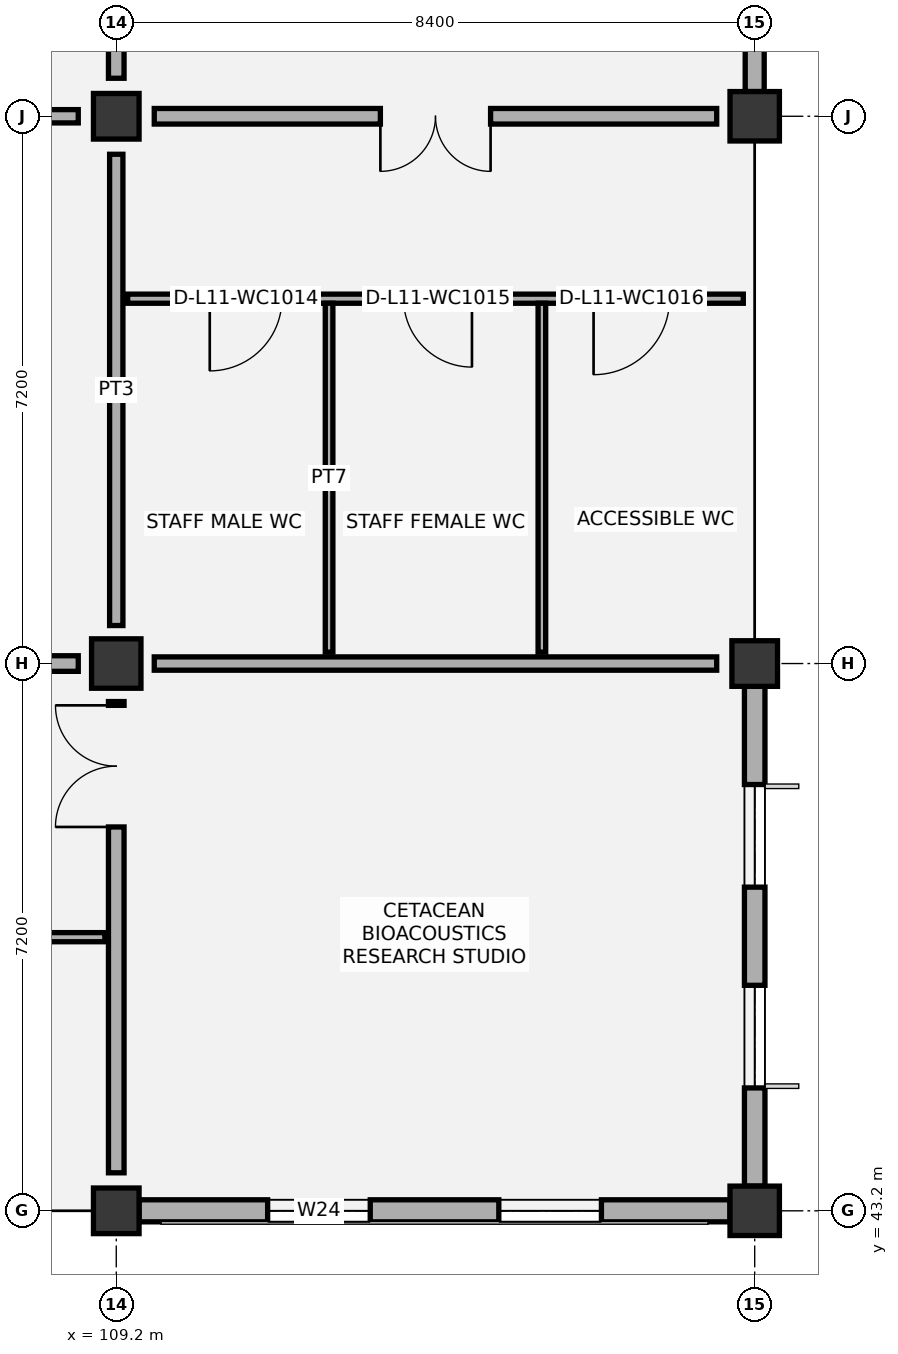
"""IFC4 building model, lengths in metres.
Left out: names, types, materials, properties, quantities, classifications, styles, units other than length and angle.
Written with IfcOpenShell. Run it as: python <this file> out.ifc"""

import sys

from ifc_helpers import new_model, si_unit, direction, frame, frame_2d, origin, origin_2d, place, context, subcontext, project, spatial, rectangle, extrude, element, fill, save


model = new_model("IFC4")
c1 = context("Model", 3, precision=1e-05, world=origin(), true_north=direction((0.0, 1.0)))
c2 = subcontext(c1, "Body", "Model", "MODEL_VIEW")
j1 = project(units=[si_unit("LENGTHUNIT", "METRE"), si_unit("PLANEANGLEUNIT", "RADIAN")], contexts=[c1])
p1 = place(None, origin())
s1 = spatial("IfcSite", under=j1, at=p1, CompositionType="ELEMENT")
p2 = place(p1, origin())
s2 = spatial("IfcBuilding", under=s1, at=p2, CompositionType="ELEMENT")
p3 = place(p2, frame((0.0, 0.0, 52.2)))
s3 = spatial("IfcBuildingStorey", under=s2, at=p3, CompositionType="ELEMENT", Elevation=52.2)
p4 = place(p3, frame((109.2, 43.2, 0.0), z_axis=(0.0, 0.0, 1.0), x_axis=(1.0, 0.0, 0.0)))
e1 = element("IfcColumn", 1, at=p4, inside=s3, PredefinedType="COLUMN", context=c2, shape_type="SweptSolid", body=[
    extrude(rectangle(XDim=0.6, YDim=0.6, at=origin_2d()), origin(), (0.0, 0.0, 1.0), 4.2),
])
p5 = place(p3, frame((109.2, 50.4, 0.0), z_axis=(0.0, 0.0, 1.0), x_axis=(1.0, 0.0, 0.0)))
e2 = element("IfcColumn", 2, at=p5, inside=s3, PredefinedType="COLUMN", context=c2, shape_type="SweptSolid", body=[
    extrude(rectangle(XDim=0.65, YDim=0.65, at=origin_2d()), origin(), (0.0, 0.0, 1.0), 4.2),
])
p6 = place(p3, frame((109.2, 57.6, 0.0), z_axis=(0.0, 0.0, 1.0), x_axis=(1.0, 0.0, 0.0)))
e3 = element("IfcColumn", 3, at=p6, inside=s3, PredefinedType="COLUMN", context=c2, shape_type="SweptSolid", body=[
    extrude(rectangle(XDim=0.6, YDim=0.6, at=origin_2d()), origin(), (0.0, 0.0, 1.0), 4.2),
])
p7 = place(p3, frame((117.6, 43.2, 0.0), z_axis=(0.0, 0.0, 1.0), x_axis=(1.0, 0.0, 0.0)))
e4 = element("IfcColumn", 4, at=p7, inside=s3, PredefinedType="COLUMN", context=c2, shape_type="SweptSolid", body=[
    extrude(rectangle(XDim=0.65, YDim=0.65, at=origin_2d()), origin(), (0.0, 0.0, 1.0), 4.2),
])
p8 = place(p3, frame((117.6, 50.4, 0.0), z_axis=(0.0, 0.0, 1.0), x_axis=(1.0, 0.0, 0.0)))
e5 = element("IfcColumn", 5, at=p8, inside=s3, PredefinedType="COLUMN", context=c2, shape_type="SweptSolid", body=[
    extrude(rectangle(XDim=0.6, YDim=0.6, at=origin_2d()), origin(), (0.0, 0.0, 1.0), 4.2),
])
p9 = place(p3, frame((117.6, 57.6, 0.0), z_axis=(0.0, 0.0, 1.0), x_axis=(1.0, 0.0, 0.0)))
e6 = element("IfcColumn", 6, at=p9, inside=s3, PredefinedType="COLUMN", context=c2, shape_type="SweptSolid", body=[
    extrude(rectangle(XDim=0.65, YDim=0.65, at=origin_2d()), origin(), (0.0, 0.0, 1.0), 4.2),
])
p10 = place(p3, frame((109.5, 43.2, 0.0), z_axis=(0.0, 0.0, 1.0), x_axis=(1.0, 0.0, 0.0)))
e7 = element("IfcWall", 7, at=p10, inside=s3, PredefinedType="SOLIDWALL", context=c2, shape_type="SweptSolid", body=[
    extrude(rectangle(XDim=7.775, YDim=0.29, at=frame_2d((3.887, 0.0))), origin(), (0.0, 0.0, 1.0), 3.365),
])
p11 = place(p10, frame((1.692, 0.0, 0.95)))
e8 = element("IfcOpeningElement", 8, at=p11, cuts=e7, PredefinedType="OPENING", context=c2, shape_type="SweptSolid", body=[
    extrude(rectangle(XDim=1.35, YDim=1.65, at=frame_2d((0.675, 0.825))), frame((0.0, 0.155, 0.0), z_axis=(0.0, -1.0, 0.0), x_axis=(1.0, 0.0, 0.0)), (0.0, 0.0, 1.0), 0.31),
])
p12 = place(p10, frame((4.733, 0.0, 0.95)))
e9 = element("IfcOpeningElement", 9, at=p12, cuts=e7, PredefinedType="OPENING", context=c2, shape_type="SweptSolid", body=[
    extrude(rectangle(XDim=1.35, YDim=1.65, at=frame_2d((0.675, 0.825))), frame((0.0, 0.155, 0.0), z_axis=(0.0, -1.0, 0.0), x_axis=(1.0, 0.0, 0.0)), (0.0, 0.0, 1.0), 0.31),
])
p13 = place(p3, frame((117.6, 43.525, 0.0), z_axis=(0.0, 0.0, 1.0), x_axis=(0.0, 1.0, 0.0)))
e10 = element("IfcWall", 10, at=p13, inside=s3, PredefinedType="SOLIDWALL", context=c2, shape_type="SweptSolid", body=[
    extrude(rectangle(XDim=6.575, YDim=0.27, at=frame_2d((3.288, 0.0))), origin(), (0.0, 0.0, 1.0), 3.365),
])
p14 = place(p13, frame((1.292, 0.0, 0.95)))
e11 = element("IfcOpeningElement", 11, at=p14, cuts=e10, PredefinedType="OPENING", context=c2, shape_type="SweptSolid", body=[
    extrude(rectangle(XDim=1.35, YDim=1.65, at=frame_2d((0.675, 0.825))), frame((0.0, 0.145, 0.0), z_axis=(0.0, -1.0, 0.0), x_axis=(1.0, 0.0, 0.0)), (0.0, 0.0, 1.0), 0.29),
])
p15 = place(p13, frame((3.933, 0.0, 0.95)))
e12 = element("IfcOpeningElement", 12, at=p15, cuts=e10, PredefinedType="OPENING", context=c2, shape_type="SweptSolid", body=[
    extrude(rectangle(XDim=1.35, YDim=1.65, at=frame_2d((0.675, 0.825))), frame((0.0, 0.145, 0.0), z_axis=(0.0, -1.0, 0.0), x_axis=(1.0, 0.0, 0.0)), (0.0, 0.0, 1.0), 0.29),
])
p16 = place(p3, frame((117.6, 57.925, 0.0), z_axis=(0.0, 0.0, 1.0), x_axis=(0.0, 1.0, 0.0)))
e13 = element("IfcWall", 13, at=p16, inside=s3, PredefinedType="SOLIDWALL", context=c2, shape_type="SweptSolid", body=[
    extrude(rectangle(XDim=6.575, YDim=0.25, at=frame_2d((3.288, 0.0))), origin(), (0.0, 0.0, 1.0), 3.365),
])
p17 = place(p16, frame((0.992, 0.0, 0.95)))
e14 = element("IfcOpeningElement", 14, at=p17, cuts=e13, PredefinedType="OPENING", context=c2, shape_type="SweptSolid", body=[
    extrude(rectangle(XDim=1.8, YDim=1.5, at=frame_2d((0.9, 0.75))), frame((0.0, 0.135, 0.0), z_axis=(0.0, -1.0, 0.0), x_axis=(1.0, 0.0, 0.0)), (0.0, 0.0, 1.0), 0.27),
])
p18 = place(p16, frame((3.783, 0.0, 0.95)))
e15 = element("IfcOpeningElement", 15, at=p18, cuts=e13, PredefinedType="OPENING", context=c2, shape_type="SweptSolid", body=[
    extrude(rectangle(XDim=1.8, YDim=1.5, at=frame_2d((0.9, 0.75))), frame((0.0, 0.135, 0.0), z_axis=(0.0, -1.0, 0.0), x_axis=(1.0, 0.0, 0.0)), (0.0, 0.0, 1.0), 0.27),
])
p19 = place(p3, frame((109.35, 55.2, 0.0), z_axis=(0.0, 0.0, 1.0), x_axis=(1.0, 0.0, 0.0)))
e16 = element("IfcWall", 16, at=p19, inside=s3, PredefinedType="PARTITIONING", context=c2, shape_type="SweptSolid", body=[
    extrude(rectangle(XDim=8.1, YDim=0.12, at=frame_2d((4.05, 0.0))), origin(), (0.0, 0.0, 1.0), 3.92),
])
p20 = place(p19, frame((1.08, 0.0, 0.0)))
e17 = element("IfcOpeningElement", 17, at=p20, cuts=e16, PredefinedType="OPENING", context=c2, shape_type="SweptSolid", body=[
    extrude(rectangle(XDim=0.95, YDim=2.1, at=frame_2d((0.475, 1.05))), frame((0.0, 0.07, 0.0), z_axis=(0.0, -1.0, 0.0), x_axis=(1.0, 0.0, 0.0)), (0.0, 0.0, 1.0), 0.14),
])
p21 = place(p19, frame((3.63, 0.0, 0.0)))
e18 = element("IfcOpeningElement", 18, at=p21, cuts=e16, PredefinedType="OPENING", context=c2, shape_type="SweptSolid", body=[
    extrude(rectangle(XDim=0.9, YDim=2.1, at=frame_2d((0.45, 1.05))), frame((0.0, 0.07, 0.0), z_axis=(0.0, -1.0, 0.0), x_axis=(1.0, 0.0, 0.0)), (0.0, 0.0, 1.0), 0.14),
])
p22 = place(p19, frame((6.13, 0.0, 0.0)))
e19 = element("IfcOpeningElement", 19, at=p22, cuts=e16, PredefinedType="OPENING", context=c2, shape_type="SweptSolid", body=[
    extrude(rectangle(XDim=1.0, YDim=2.1, at=frame_2d((0.5, 1.05))), frame((0.0, 0.07, 0.0), z_axis=(0.0, -1.0, 0.0), x_axis=(1.0, 0.0, 0.0)), (0.0, 0.0, 1.0), 0.14),
])
for number, where, z_axis, x_axis in (
    (20, (112.0, 50.55, 0.0), (0.0, 0.0, 1.0), (0.0, 1.0, 0.0)),
    (21, (114.8, 50.55, 0.0), (0.0, 0.0, 1.0), (0.0, 1.0, 0.0)),
):
    element("IfcWall", number, at=place(p3, frame(where, z_axis=z_axis, x_axis=x_axis)), inside=s3, PredefinedType="PARTITIONING", context=c2, shape_type="SweptSolid", body=[
        extrude(rectangle(XDim=4.59, YDim=0.1, at=frame_2d((2.295, 0.0))), origin(), (0.0, 0.0, 1.0), 3.92),
    ])
p23 = place(p3, frame((100.95, 46.8, 0.0), z_axis=(0.0, 0.0, 1.0), x_axis=(1.0, 0.0, 0.0)))
e22 = element("IfcWall", 22, at=p23, inside=s3, PredefinedType="PARTITIONING", context=c2, shape_type="SweptSolid", body=[
    extrude(rectangle(XDim=8.1, YDim=0.12, at=frame_2d((4.05, 0.0))), origin(), (0.0, 0.0, 1.0), 3.92),
])
p24 = place(p23, frame((3.55, 0.0, 0.0)))
e23 = element("IfcOpeningElement", 23, at=p24, cuts=e22, PredefinedType="OPENING", context=c2, shape_type="SweptSolid", body=[
    extrude(rectangle(XDim=1.6, YDim=2.2, at=frame_2d((0.8, 1.1))), frame((0.0, 0.07, 0.0), z_axis=(0.0, -1.0, 0.0), x_axis=(1.0, 0.0, 0.0)), (0.0, 0.0, 1.0), 0.14),
])
p25 = place(p3, frame((109.2, 43.7, 0.0), z_axis=(0.0, 0.0, 1.0), x_axis=(0.0, 1.0, 0.0)))
e24 = element("IfcWall", 24, at=p25, inside=s3, PredefinedType="PARTITIONING", context=c2, shape_type="SweptSolid", body=[
    extrude(rectangle(XDim=6.2, YDim=0.205, at=frame_2d((3.1, 0.0))), origin(), (0.0, 0.0, 1.0), 3.515),
])
p26 = place(p25, frame((4.55, 0.0, 0.0)))
e25 = element("IfcOpeningElement", 25, at=p26, cuts=e24, PredefinedType="OPENING", context=c2, shape_type="SweptSolid", body=[
    extrude(rectangle(XDim=1.6, YDim=2.2, at=frame_2d((0.8, 1.1))), frame((0.0, 0.113, 0.0), z_axis=(0.0, -1.0, 0.0), x_axis=(1.0, 0.0, 0.0)), (0.0, 0.0, 1.0), 0.225),
])
p27 = place(p3, frame((101.3, 50.4, 0.0), z_axis=(0.0, 0.0, 1.0), x_axis=(1.0, 0.0, 0.0)))
e26 = element("IfcWall", 26, at=p27, inside=s3, PredefinedType="PARTITIONING", context=c2, shape_type="SweptSolid", body=[
    extrude(rectangle(XDim=7.4, YDim=0.205, at=frame_2d((3.7, 0.0))), origin(), (0.0, 0.0, 1.0), 3.565),
])
p28 = place(p27, frame((3.025, 0.0, 0.0)))
e27 = element("IfcOpeningElement", 27, at=p28, cuts=e26, PredefinedType="OPENING", context=c2, shape_type="SweptSolid", body=[
    extrude(rectangle(XDim=1.35, YDim=2.15, at=frame_2d((0.675, 1.075))), frame((0.0, 0.113, 0.0), z_axis=(0.0, -1.0, 0.0), x_axis=(1.0, 0.0, 0.0)), (0.0, 0.0, 1.0), 0.225),
])
p29 = place(p3, frame((109.2, 50.9, 0.0), z_axis=(0.0, 0.0, 1.0), x_axis=(0.0, 1.0, 0.0)))
e28 = element("IfcWall", 28, at=p29, inside=s3, PredefinedType="PARTITIONING", context=c2, shape_type="SweptSolid", body=[
    extrude(rectangle(XDim=6.2, YDim=0.175, at=frame_2d((3.1, 0.0))), origin(), (0.0, 0.0, 1.0), 3.415),
])
p30 = place(p3, frame((101.3, 57.6, 0.0), z_axis=(0.0, 0.0, 1.0), x_axis=(1.0, 0.0, 0.0)))
e29 = element("IfcWall", 29, at=p30, inside=s3, PredefinedType="PARTITIONING", context=c2, shape_type="SweptSolid", body=[
    extrude(rectangle(XDim=7.4, YDim=0.175, at=frame_2d((3.7, 0.0))), origin(), (0.0, 0.0, 1.0), 3.565),
])
p31 = place(p30, frame((3.075, 0.0, 0.0)))
e30 = element("IfcOpeningElement", 30, at=p31, cuts=e29, PredefinedType="OPENING", context=c2, shape_type="SweptSolid", body=[
    extrude(rectangle(XDim=1.25, YDim=2.1, at=frame_2d((0.625, 1.05))), frame((0.0, 0.097, 0.0), z_axis=(0.0, -1.0, 0.0), x_axis=(1.0, 0.0, 0.0)), (0.0, 0.0, 1.0), 0.195),
])
p32 = place(p3, frame((109.2, 58.1, 0.0), z_axis=(0.0, 0.0, 1.0), x_axis=(0.0, 1.0, 0.0)))
e31 = element("IfcWall", 31, at=p32, inside=s3, PredefinedType="PARTITIONING", context=c2, shape_type="SweptSolid", body=[
    extrude(rectangle(XDim=6.2, YDim=0.205, at=frame_2d((3.1, 0.0))), origin(), (0.0, 0.0, 1.0), 3.625),
])
p33 = place(p32, frame((2.35, 0.0, 0.0)))
e32 = element("IfcOpeningElement", 32, at=p33, cuts=e31, PredefinedType="OPENING", context=c2, shape_type="SweptSolid", body=[
    extrude(rectangle(XDim=1.5, YDim=2.2, at=frame_2d((0.75, 1.1))), frame((0.0, 0.113, 0.0), z_axis=(0.0, -1.0, 0.0), x_axis=(1.0, 0.0, 0.0)), (0.0, 0.0, 1.0), 0.225),
])
p34 = place(p3, frame((109.7, 50.4, 0.0), z_axis=(0.0, 0.0, 1.0), x_axis=(1.0, 0.0, 0.0)))
e33 = element("IfcWall", 33, at=p34, inside=s3, PredefinedType="PARTITIONING", context=c2, shape_type="SweptSolid", body=[
    extrude(rectangle(XDim=7.4, YDim=0.175, at=frame_2d((3.7, 0.0))), origin(), (0.0, 0.0, 1.0), 3.365),
])
p35 = place(p3, frame((109.7, 57.6, 0.0), z_axis=(0.0, 0.0, 1.0), x_axis=(1.0, 0.0, 0.0)))
e34 = element("IfcWall", 34, at=p35, inside=s3, PredefinedType="PARTITIONING", context=c2, shape_type="SweptSolid", body=[
    extrude(rectangle(XDim=7.4, YDim=0.205, at=frame_2d((3.7, 0.0))), origin(), (0.0, 0.0, 1.0), 3.365),
])
p36 = place(p35, frame((2.975, 0.0, 0.0)))
e35 = element("IfcOpeningElement", 35, at=p36, cuts=e34, PredefinedType="OPENING", context=c2, shape_type="SweptSolid", body=[
    extrude(rectangle(XDim=1.45, YDim=2.2, at=frame_2d((0.725, 1.1))), frame((0.0, 0.113, 0.0), z_axis=(0.0, -1.0, 0.0), x_axis=(1.0, 0.0, 0.0)), (0.0, 0.0, 1.0), 0.225),
])
p37 = place(p11, origin())
e36 = element("IfcWindow", 36, at=p37, inside=s3, PartitioningType="SINGLE_PANEL", PredefinedType="WINDOW", context=c2, shape_type="SweptSolid", body=[
    extrude(rectangle(XDim=1.35, YDim=1.65, at=frame_2d((0.675, 0.825))), frame((0.0, 0.03, 0.0), z_axis=(0.0, -1.0, 0.0), x_axis=(1.0, 0.0, 0.0)), (0.0, 0.0, 1.0), 0.06),
])
fill(e8, e36)
p38 = place(p12, origin())
e37 = element("IfcWindow", 37, at=p38, inside=s3, PartitioningType="SINGLE_PANEL", PredefinedType="WINDOW", context=c2, shape_type="SweptSolid", body=[
    extrude(rectangle(XDim=1.35, YDim=1.65, at=frame_2d((0.675, 0.825))), frame((0.0, 0.03, 0.0), z_axis=(0.0, -1.0, 0.0), x_axis=(1.0, 0.0, 0.0)), (0.0, 0.0, 1.0), 0.06),
])
fill(e9, e37)
p39 = place(p14, origin())
e38 = element("IfcWindow", 38, at=p39, inside=s3, PartitioningType="SINGLE_PANEL", PredefinedType="WINDOW", context=c2, shape_type="SweptSolid", body=[
    extrude(rectangle(XDim=1.35, YDim=1.65, at=frame_2d((0.675, 0.825))), frame((0.0, 0.03, 0.0), z_axis=(0.0, -1.0, 0.0), x_axis=(1.0, 0.0, 0.0)), (0.0, 0.0, 1.0), 0.06),
])
fill(e11, e38)
p40 = place(p15, origin())
e39 = element("IfcWindow", 39, at=p40, inside=s3, PartitioningType="SINGLE_PANEL", PredefinedType="WINDOW", context=c2, shape_type="SweptSolid", body=[
    extrude(rectangle(XDim=1.35, YDim=1.65, at=frame_2d((0.675, 0.825))), frame((0.0, 0.03, 0.0), z_axis=(0.0, -1.0, 0.0), x_axis=(1.0, 0.0, 0.0)), (0.0, 0.0, 1.0), 0.06),
])
fill(e12, e39)
p41 = place(p20, frame((0.95, 0.0, 0.0), z_axis=(0.0, 0.0, 1.0), x_axis=(-1.0, 0.0, 0.0)))
e40 = element("IfcDoor", 40, at=p41, inside=s3, OperationType="SINGLE_SWING_RIGHT", PredefinedType="DOOR", context=c2, shape_type="SweptSolid", body=[
    extrude(rectangle(XDim=0.95, YDim=2.1, at=frame_2d((0.475, 1.05))), frame((0.0, 0.025, 0.0), z_axis=(0.0, -1.0, 0.0), x_axis=(1.0, 0.0, 0.0)), (0.0, 0.0, 1.0), 0.05),
])
fill(e17, e40)
p42 = place(p21, frame((0.9, 0.0, 0.0), z_axis=(0.0, 0.0, 1.0), x_axis=(-1.0, 0.0, 0.0)))
e41 = element("IfcDoor", 41, at=p42, inside=s3, OperationType="SINGLE_SWING_LEFT", PredefinedType="DOOR", context=c2, shape_type="SweptSolid", body=[
    extrude(rectangle(XDim=0.9, YDim=2.1, at=frame_2d((0.45, 1.05))), frame((0.0, 0.025, 0.0), z_axis=(0.0, -1.0, 0.0), x_axis=(1.0, 0.0, 0.0)), (0.0, 0.0, 1.0), 0.05),
])
fill(e18, e41)
p43 = place(p22, frame((1.0, 0.0, 0.0), z_axis=(0.0, 0.0, 1.0), x_axis=(-1.0, 0.0, 0.0)))
e42 = element("IfcDoor", 42, at=p43, inside=s3, OperationType="SINGLE_SWING_RIGHT", PredefinedType="DOOR", context=c2, shape_type="SweptSolid", body=[
    extrude(rectangle(XDim=1.0, YDim=2.1, at=frame_2d((0.5, 1.05))), frame((0.0, 0.025, 0.0), z_axis=(0.0, -1.0, 0.0), x_axis=(1.0, 0.0, 0.0)), (0.0, 0.0, 1.0), 0.05),
])
fill(e19, e42)
p44 = place(p26, origin())
e43 = element("IfcDoor", 43, at=p44, inside=s3, OperationType="DOUBLE_DOOR_SINGLE_SWING", PredefinedType="DOOR", context=c2, shape_type="SweptSolid", body=[
    extrude(rectangle(XDim=1.6, YDim=2.2, at=frame_2d((0.8, 1.1))), frame((0.0, 0.025, 0.0), z_axis=(0.0, -1.0, 0.0), x_axis=(1.0, 0.0, 0.0)), (0.0, 0.0, 1.0), 0.05),
])
fill(e25, e43)
p45 = place(p36, frame((1.45, 0.0, 0.0), z_axis=(0.0, 0.0, 1.0), x_axis=(-1.0, 0.0, 0.0)))
e44 = element("IfcDoor", 44, at=p45, inside=s3, OperationType="DOUBLE_DOOR_SINGLE_SWING", PredefinedType="DOOR", context=c2, shape_type="SweptSolid", body=[
    extrude(rectangle(XDim=1.45, YDim=2.2, at=frame_2d((0.725, 1.1))), frame((0.0, 0.025, 0.0), z_axis=(0.0, -1.0, 0.0), x_axis=(1.0, 0.0, 0.0)), (0.0, 0.0, 1.0), 0.05),
])
fill(e35, e44)
save(model, sys.argv[1])
